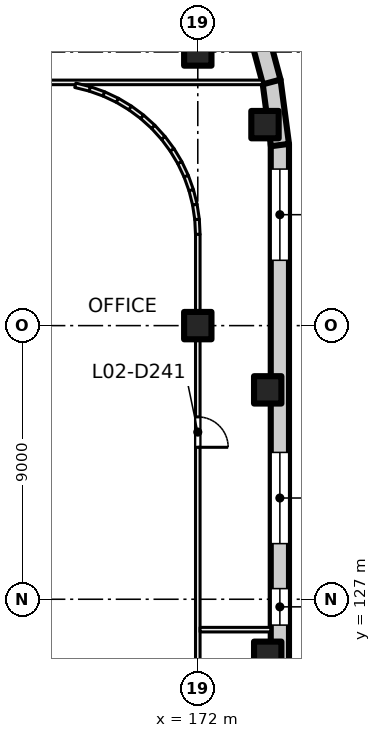
"""IFC4 building model, lengths in metres.
Left out: names, types, materials, properties, quantities, classifications, styles, units other than length and angle.
Written with IfcOpenShell. Run it as: python <this file> out.ifc"""

import sys

from ifc_helpers import new_model, si_unit, direction, frame, frame_2d, origin, origin_2d, place, context, subcontext, project, spatial, rectangle, extrude, element, fill, save


model = new_model("IFC4")
c1 = context("Model", 3, precision=1e-05, world=origin(), true_north=direction((0.0, 1.0)))
c2 = subcontext(c1, "Body", "Model", "MODEL_VIEW")
j1 = project(units=[si_unit("LENGTHUNIT", "METRE"), si_unit("PLANEANGLEUNIT", "RADIAN")], contexts=[c1])
p1 = place(None, origin())
s1 = spatial("IfcSite", under=j1, at=p1, CompositionType="ELEMENT")
p2 = place(p1, origin())
s2 = spatial("IfcBuilding", under=s1, at=p2, CompositionType="ELEMENT")
p3 = place(p2, frame((0.0, 0.0, 12.5)))
s3 = spatial("IfcBuildingStorey", under=s2, at=p3, CompositionType="ELEMENT", Elevation=12.5)
for number, where, z_axis, x_axis in (
    (1, (172.0, 136.0, 0.0), (0.0, 0.0, 1.0), (1.0, 0.0, 0.0)),
    (2, (172.0, 145.0, 0.0), (0.0, 0.0, 1.0), (1.0, 0.0, 0.0)),
    (3, (174.211, 142.611, 0.0), (0.0, 0.0, 1.0), (1.0, 0.0, 0.0)),
    (4, (174.3, 133.887, 0.0), (0.0, 0.0, 1.0), (1.0, 0.0, 0.0)),
    (5, (174.3, 125.157, 0.0), (0.0, 0.0, 1.0), (1.0, 0.0, 0.0)),
):
    element("IfcColumn", number, at=place(p3, frame(where, z_axis=z_axis, x_axis=x_axis)), inside=s3, PredefinedType="COLUMN", context=c2, shape_type="SweptSolid", body=[
        extrude(rectangle(XDim=0.9, YDim=0.9, at=origin_2d()), origin(), (0.0, 0.0, 1.0), 5.0),
    ])
p4 = place(p3, frame((174.7, 141.978, 0.0), z_axis=(0.0, 0.0, 1.0), x_axis=(0.0, -1.0, 0.0)))
e6 = element("IfcWall", 6, at=p4, inside=s3, PredefinedType="SOLIDWALL", context=c2, shape_type="SweptSolid", body=[
    extrude(rectangle(XDim=27.957, YDim=0.6, at=frame_2d((13.978, 0.0))), origin(), (0.0, 0.0, 1.0), 4.6),
])
p5 = place(p4, frame((0.83, 0.0, 0.9)))
e7 = element("IfcOpeningElement", 7, at=p5, cuts=e6, PredefinedType="OPENING", context=c2, shape_type="SweptSolid", body=[
    extrude(rectangle(XDim=3.0, YDim=3.0, at=frame_2d((1.5, 1.5))), frame((0.0, 0.31, 0.0), z_axis=(0.0, -1.0, 0.0), x_axis=(1.0, 0.0, 0.0)), (0.0, 0.0, 1.0), 0.62),
])
p6 = place(p4, frame((10.148, 0.0, 0.9)))
e8 = element("IfcOpeningElement", 8, at=p6, cuts=e6, PredefinedType="OPENING", context=c2, shape_type="SweptSolid", body=[
    extrude(rectangle(XDim=3.0, YDim=3.0, at=frame_2d((1.5, 1.5))), frame((0.0, 0.31, 0.0), z_axis=(0.0, -1.0, 0.0), x_axis=(1.0, 0.0, 0.0)), (0.0, 0.0, 1.0), 0.62),
])
p7 = place(p4, frame((14.628, 0.0, 0.9)))
e9 = element("IfcOpeningElement", 9, at=p7, cuts=e6, PredefinedType="OPENING", context=c2, shape_type="SweptSolid", body=[
    extrude(rectangle(XDim=1.2, YDim=3.0, at=frame_2d((0.6, 1.5))), frame((0.0, 0.31, 0.0), z_axis=(0.0, -1.0, 0.0), x_axis=(1.0, 0.0, 0.0)), (0.0, 0.0, 1.0), 0.62),
])
p8 = place(p4, frame((19.467, 0.0, 0.9)))
e10 = element("IfcOpeningElement", 10, at=p8, cuts=e6, PredefinedType="OPENING", context=c2, shape_type="SweptSolid", body=[
    extrude(rectangle(XDim=3.0, YDim=3.0, at=frame_2d((1.5, 1.5))), frame((0.0, 0.31, 0.0), z_axis=(0.0, -1.0, 0.0), x_axis=(1.0, 0.0, 0.0)), (0.0, 0.0, 1.0), 0.62),
])
p9 = place(p3, frame((174.424, 144.052, 0.0), z_axis=(0.0, 0.0, 1.0), x_axis=(0.130558200013, -0.991440646942, 0.0)))
e11 = element("IfcWall", 11, at=p9, inside=s3, PredefinedType="SOLIDWALL", context=c2, shape_type="SweptSolid", body=[
    extrude(rectangle(XDim=2.132, YDim=0.6, at=frame_2d((1.066, 0.0))), origin(), (0.0, 0.0, 1.0), 4.6),
])
p10 = place(p3, frame((173.908, 145.968, 0.0), z_axis=(0.0, 0.0, 1.0), x_axis=(0.258804467146, -0.965929732323, 0.0)))
e12 = element("IfcWall", 12, at=p10, inside=s3, PredefinedType="SOLIDWALL", context=c2, shape_type="SweptSolid", body=[
    extrude(rectangle(XDim=2.022, YDim=0.6, at=frame_2d((1.011, 0.0))), origin(), (0.0, 0.0, 1.0), 4.6),
])
p11 = place(p3, frame((154.075, 144.0, 0.0), z_axis=(0.0, 0.0, 1.0), x_axis=(1.0, 0.0, 0.0)))
e13 = element("IfcWall", 13, at=p11, inside=s3, PredefinedType="PARTITIONING", context=c2, shape_type="SweptSolid", body=[
    extrude(rectangle(XDim=20.05, YDim=0.15, at=frame_2d((10.025, 0.0))), origin(), (0.0, 0.0, 1.0), 4.6),
])
p12 = place(p11, frame((2.427, 0.0, 0.0)))
e14 = element("IfcOpeningElement", 14, at=p12, cuts=e13, PredefinedType="OPENING", context=c2, shape_type="SweptSolid", body=[
    extrude(rectangle(XDim=1.0, YDim=2.1, at=frame_2d((0.5, 1.05))), frame((0.0, 0.085, 0.0), z_axis=(0.0, -1.0, 0.0), x_axis=(1.0, 0.0, 0.0)), (0.0, 0.0, 1.0), 0.17),
])
p13 = place(p11, frame((9.623, 0.0, 0.0)))
e15 = element("IfcOpeningElement", 15, at=p13, cuts=e13, PredefinedType="OPENING", context=c2, shape_type="SweptSolid", body=[
    extrude(rectangle(XDim=1.0, YDim=2.1, at=frame_2d((0.5, 1.05))), frame((0.0, 0.085, 0.0), z_axis=(0.0, -1.0, 0.0), x_axis=(1.0, 0.0, 0.0)), (0.0, 0.0, 1.0), 0.17),
])
p14 = place(p3, frame((167.971, 143.905, 0.0), z_axis=(0.0, 0.0, 1.0), x_axis=(0.970113715952, -0.242650732785, 0.0)))
e16 = element("IfcWall", 16, at=p14, inside=s3, PredefinedType="PARTITIONING", context=c2, shape_type="SweptSolid", body=[
    extrude(rectangle(XDim=0.499, YDim=0.15, at=frame_2d((0.25, 0.0))), origin(), (0.0, 0.0, 1.0), 4.6),
])
for number, where, z_axis, x_axis in (
    (17, (168.447, 143.786, 0.0), (0.0, 0.0, 1.0), (0.941, -0.337, 0.0)),
    (18, (168.91, 143.621, 0.0), (0.0, 0.0, 1.0), (0.904, -0.428, 0.0)),
):
    element("IfcWall", number, at=place(p3, frame(where, z_axis=z_axis, x_axis=x_axis)), inside=s3, PredefinedType="PARTITIONING", context=c2, shape_type="SweptSolid", body=[
        extrude(rectangle(XDim=0.498, YDim=0.15, at=frame_2d((0.249, 0.0))), origin(), (0.0, 0.0, 1.0), 4.6),
    ])
p15 = place(p3, frame((169.354, 143.412, 0.0), z_axis=(0.0, 0.0, 1.0), x_axis=(0.85671397893, -0.515791778052, 0.0)))
e19 = element("IfcWall", 19, at=p15, inside=s3, PredefinedType="PARTITIONING", context=c2, shape_type="SweptSolid", body=[
    extrude(rectangle(XDim=0.499, YDim=0.15, at=frame_2d((0.249, 0.0))), origin(), (0.0, 0.0, 1.0), 4.6),
])
p16 = place(p3, frame((169.775, 143.159, 0.0), z_axis=(0.0, 0.0, 1.0), x_axis=(0.80404358372, -0.594570362092, 0.0)))
e20 = element("IfcWall", 20, at=p16, inside=s3, PredefinedType="PARTITIONING", context=c2, shape_type="SweptSolid", body=[
    extrude(rectangle(XDim=0.498, YDim=0.15, at=frame_2d((0.249, 0.0))), origin(), (0.0, 0.0, 1.0), 4.6),
])
for number, where, z_axis, x_axis in (
    (21, (170.169, 142.867, 0.0), (0.0, 0.0, 1.0), (0.742, -0.67, 0.0)),
    (22, (170.533, 142.539, 0.0), (0.0, 0.0, 1.0), (0.67, -0.742, 0.0)),
):
    element("IfcWall", number, at=place(p3, frame(where, z_axis=z_axis, x_axis=x_axis)), inside=s3, PredefinedType="PARTITIONING", context=c2, shape_type="SweptSolid", body=[
        extrude(rectangle(XDim=0.499, YDim=0.15, at=frame_2d((0.249, 0.0))), origin(), (0.0, 0.0, 1.0), 4.6),
    ])
p17 = place(p3, frame((170.863, 142.175, 0.0), z_axis=(0.0, 0.0, 1.0), x_axis=(0.594570362092, -0.80404358372, 0.0)))
e23 = element("IfcWall", 23, at=p17, inside=s3, PredefinedType="PARTITIONING", context=c2, shape_type="SweptSolid", body=[
    extrude(rectangle(XDim=0.498, YDim=0.15, at=frame_2d((0.249, 0.0))), origin(), (0.0, 0.0, 1.0), 4.6),
])
p18 = place(p3, frame((171.155, 141.781, 0.0), z_axis=(0.0, 0.0, 1.0), x_axis=(0.515791778052, -0.85671397893, 0.0)))
e24 = element("IfcWall", 24, at=p18, inside=s3, PredefinedType="PARTITIONING", context=c2, shape_type="SweptSolid", body=[
    extrude(rectangle(XDim=0.499, YDim=0.15, at=frame_2d((0.249, 0.0))), origin(), (0.0, 0.0, 1.0), 4.6),
])
for number, where, z_axis, x_axis in (
    (25, (171.408, 141.36, 0.0), (0.0, 0.0, 1.0), (0.428, -0.904, 0.0)),
    (26, (171.618, 140.916, 0.0), (0.0, 0.0, 1.0), (0.337, -0.941, 0.0)),
):
    element("IfcWall", number, at=place(p3, frame(where, z_axis=z_axis, x_axis=x_axis)), inside=s3, PredefinedType="PARTITIONING", context=c2, shape_type="SweptSolid", body=[
        extrude(rectangle(XDim=0.498, YDim=0.15, at=frame_2d((0.249, 0.0))), origin(), (0.0, 0.0, 1.0), 4.6),
    ])
p19 = place(p3, frame((171.784, 140.455, 0.0), z_axis=(0.0, 0.0, 1.0), x_axis=(0.242650732785, -0.970113715952, 0.0)))
e27 = element("IfcWall", 27, at=p19, inside=s3, PredefinedType="PARTITIONING", context=c2, shape_type="SweptSolid", body=[
    extrude(rectangle(XDim=0.499, YDim=0.15, at=frame_2d((0.25, 0.0))), origin(), (0.0, 0.0, 1.0), 4.6),
])
p20 = place(p3, frame((171.903, 139.979, 0.0), z_axis=(0.0, 0.0, 1.0), x_axis=(0.148412307247, -0.988925572052, 0.0)))
e28 = element("IfcWall", 28, at=p20, inside=s3, PredefinedType="PARTITIONING", context=c2, shape_type="SweptSolid", body=[
    extrude(rectangle(XDim=0.499, YDim=0.15, at=frame_2d((0.249, 0.0))), origin(), (0.0, 0.0, 1.0), 4.6),
])
p21 = place(p3, frame((171.976, 139.494, 0.0), z_axis=(0.0, 0.0, 1.0), x_axis=(0.048196018647, -0.998837896651, 0.0)))
e29 = element("IfcWall", 29, at=p21, inside=s3, PredefinedType="PARTITIONING", context=c2, shape_type="SweptSolid", body=[
    extrude(rectangle(XDim=0.496, YDim=0.15, at=frame_2d((0.248, 0.0))), origin(), (0.0, 0.0, 1.0), 4.6),
])
p22 = place(p3, frame((172.0, 139.002, 0.0), z_axis=(0.0, 0.0, 1.0), x_axis=(0.0, -1.0, 0.0)))
e30 = element("IfcWall", 30, at=p22, inside=s3, PredefinedType="PARTITIONING", context=c2, shape_type="SweptSolid", body=[
    extrude(rectangle(XDim=22.004, YDim=0.15, at=frame_2d((11.002, 0.0))), origin(), (0.0, 0.0, 1.0), 4.6),
])
p23 = place(p22, frame((17.0, 0.0, 0.0)))
e31 = element("IfcOpeningElement", 31, at=p23, cuts=e30, PredefinedType="OPENING", context=c2, shape_type="SweptSolid", body=[
    extrude(rectangle(XDim=1.0, YDim=2.1, at=frame_2d((0.5, 1.05))), frame((0.0, 0.085, 0.0), z_axis=(0.0, -1.0, 0.0), x_axis=(1.0, 0.0, 0.0)), (0.0, 0.0, 1.0), 0.17),
])
p24 = place(p22, frame((6.004, 0.0, 0.0)))
e32 = element("IfcOpeningElement", 32, at=p24, cuts=e30, PredefinedType="OPENING", context=c2, shape_type="SweptSolid", body=[
    extrude(rectangle(XDim=1.0, YDim=2.1, at=frame_2d((0.5, 1.05))), frame((0.0, 0.085, 0.0), z_axis=(0.0, -1.0, 0.0), x_axis=(1.0, 0.0, 0.0)), (0.0, 0.0, 1.0), 0.17),
])
p25 = place(p3, frame((172.075, 126.0, 0.0), z_axis=(0.0, 0.0, 1.0), x_axis=(1.0, 0.0, 0.0)))
e33 = element("IfcWall", 33, at=p25, inside=s3, PredefinedType="PARTITIONING", context=c2, shape_type="SweptSolid", body=[
    extrude(rectangle(XDim=2.325, YDim=0.15, at=frame_2d((1.163, 0.0))), origin(), (0.0, 0.0, 1.0), 4.6),
])
p26 = place(p5, origin())
e34 = element("IfcWindow", 34, at=p26, inside=s3, PartitioningType="SINGLE_PANEL", PredefinedType="WINDOW", context=c2, shape_type="SweptSolid", body=[
    extrude(rectangle(XDim=3.0, YDim=3.0, at=frame_2d((1.5, 1.5))), frame((0.0, 0.03, 0.0), z_axis=(0.0, -1.0, 0.0), x_axis=(1.0, 0.0, 0.0)), (0.0, 0.0, 1.0), 0.06),
])
fill(e7, e34)
p27 = place(p6, origin())
e35 = element("IfcWindow", 35, at=p27, inside=s3, PartitioningType="SINGLE_PANEL", PredefinedType="WINDOW", context=c2, shape_type="SweptSolid", body=[
    extrude(rectangle(XDim=3.0, YDim=3.0, at=frame_2d((1.5, 1.5))), frame((0.0, 0.03, 0.0), z_axis=(0.0, -1.0, 0.0), x_axis=(1.0, 0.0, 0.0)), (0.0, 0.0, 1.0), 0.06),
])
fill(e8, e35)
p28 = place(p7, origin())
e36 = element("IfcWindow", 36, at=p28, inside=s3, PartitioningType="SINGLE_PANEL", PredefinedType="WINDOW", context=c2, shape_type="SweptSolid", body=[
    extrude(rectangle(XDim=1.2, YDim=3.0, at=frame_2d((0.6, 1.5))), frame((0.0, 0.03, 0.0), z_axis=(0.0, -1.0, 0.0), x_axis=(1.0, 0.0, 0.0)), (0.0, 0.0, 1.0), 0.06),
])
fill(e9, e36)
p29 = place(p24, origin())
e37 = element("IfcDoor", 37, at=p29, inside=s3, OperationType="SINGLE_SWING_RIGHT", PredefinedType="DOOR", context=c2, shape_type="SweptSolid", body=[
    extrude(rectangle(XDim=1.0, YDim=2.1, at=frame_2d((0.5, 1.05))), frame((0.0, 0.025, 0.0), z_axis=(0.0, -1.0, 0.0), x_axis=(1.0, 0.0, 0.0)), (0.0, 0.0, 1.0), 0.05),
])
fill(e32, e37)
save(model, sys.argv[1])
